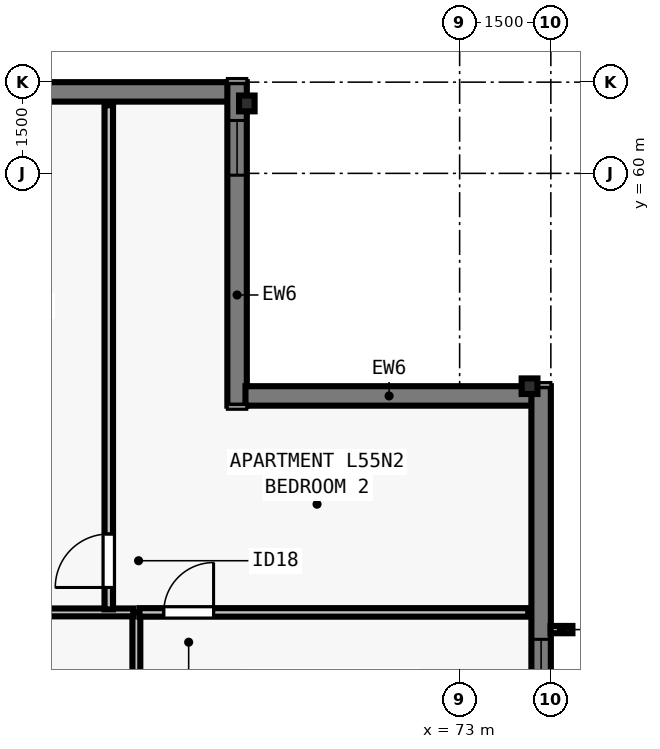
"""IFC4 building model, lengths in metres.
Left out: names, types, materials, properties, quantities, classifications, styles, units other than length and angle.
Written with IfcOpenShell. Run it as: python <this file> out.ifc"""

import sys

from ifc_helpers import new_model, si_unit, direction, frame, frame_2d, origin, origin_2d, place, context, subcontext, project, spatial, rectangle, i_section, extrude, element, fill, save


model = new_model("IFC4")
c1 = context("Model", 3, precision=1e-05, world=origin(), true_north=direction((0.0, 1.0)))
c2 = subcontext(c1, "Body", "Model", "MODEL_VIEW")
j1 = project(units=[si_unit("LENGTHUNIT", "METRE"), si_unit("PLANEANGLEUNIT", "RADIAN")], contexts=[c1])
p1 = place(None, origin())
s1 = spatial("IfcSite", under=j1, at=p1, CompositionType="ELEMENT")
p2 = place(p1, origin())
s2 = spatial("IfcBuilding", under=s1, at=p2, CompositionType="ELEMENT")
p3 = place(p2, frame((0.0, 0.0, 202.5)))
s3 = spatial("IfcBuildingStorey", under=s2, at=p3, CompositionType="ELEMENT", Elevation=202.5)
for number, where, z_axis, x_axis in (
    (1, (74.15, 56.5, 0.0), (0.0, 0.0, 1.0), (0.0, 1.0, 0.0)),
    (2, (69.5, 61.15, 0.0), (0.0, 0.0, 1.0), (1.0, 0.0, 0.0)),
):
    element("IfcColumn", number, at=place(p3, frame(where, z_axis=z_axis, x_axis=x_axis)), inside=s3, PredefinedType="COLUMN", context=c2, shape_type="SweptSolid", body=[
        extrude(i_section(OverallWidth=0.256, OverallDepth=0.26, WebThickness=0.01, FlangeThickness=0.017, FilletRadius=0.013, at=origin_2d()), origin(), (0.0, 0.0, 1.0), 3.5),
    ])
p4 = place(p3, frame((62.8, 61.34, 0.0), z_axis=(0.0, 0.0, 1.0), x_axis=(1.0, 0.0, 0.0)))
e3 = element("IfcWall", 3, at=p4, inside=s3, PredefinedType="SOLIDWALL", context=c2, shape_type="SweptSolid", body=[
    extrude(rectangle(XDim=6.402, YDim=0.32, at=frame_2d((3.201, 0.0))), origin(), (0.0, 0.0, 1.0), 3.29),
])
p5 = place(p3, frame((69.34, 61.5, 0.0), z_axis=(0.0, 0.0, 1.0), x_axis=(0.0, -1.0, 0.0)))
e4 = element("IfcWall", 4, at=p5, inside=s3, PredefinedType="SOLIDWALL", context=c2, shape_type="SweptSolid", body=[
    extrude(rectangle(XDim=5.32, YDim=0.32, at=frame_2d((2.66, 0.0))), origin(), (0.0, 0.0, 1.0), 3.29),
])
p6 = place(p5, frame((0.63, 0.0, 0.8)))
e5 = element("IfcOpeningElement", 5, at=p6, cuts=e4, PredefinedType="OPENING", context=c2, shape_type="SweptSolid", body=[
    extrude(rectangle(XDim=0.9, YDim=1.678, at=frame_2d((0.45, 0.839))), frame((0.0, 0.17, 0.0), z_axis=(0.0, -1.0, 0.0), x_axis=(1.0, 0.0, 0.0)), (0.0, 0.0, 1.0), 0.34),
])
p7 = place(p3, frame((69.478, 56.34, 0.0), z_axis=(0.0, 0.0, 1.0), x_axis=(1.0, 0.0, 0.0)))
e6 = element("IfcWall", 6, at=p7, inside=s3, PredefinedType="SOLIDWALL", context=c2, shape_type="SweptSolid", body=[
    extrude(rectangle(XDim=4.724, YDim=0.32, at=frame_2d((2.362, 0.0))), origin(), (0.0, 0.0, 1.0), 3.29),
])
p8 = place(p3, frame((74.34, 56.5, 0.0), z_axis=(0.0, 0.0, 1.0), x_axis=(0.0, -1.0, 0.0)))
e7 = element("IfcWall", 7, at=p8, inside=s3, PredefinedType="SOLIDWALL", context=c2, shape_type="SweptSolid", body=[
    extrude(rectangle(XDim=34.702, YDim=0.32, at=frame_2d((17.351, 0.0))), origin(), (0.0, 0.0, 1.0), 3.29),
])
p9 = place(p8, frame((4.163, 0.0, 0.8)))
e8 = element("IfcOpeningElement", 8, at=p9, cuts=e7, PredefinedType="OPENING", context=c2, shape_type="SweptSolid", body=[
    extrude(rectangle(XDim=1.85, YDim=1.678, at=frame_2d((0.925, 0.839))), frame((0.0, 0.17, 0.0), z_axis=(0.0, -1.0, 0.0), x_axis=(1.0, 0.0, 0.0)), (0.0, 0.0, 1.0), 0.34),
])
p10 = place(p8, frame((6.888, 0.0, 0.8)))
e9 = element("IfcOpeningElement", 9, at=p10, cuts=e7, PredefinedType="OPENING", context=c2, shape_type="SweptSolid", body=[
    extrude(rectangle(XDim=1.55, YDim=1.678, at=frame_2d((0.775, 0.839))), frame((0.0, 0.17, 0.0), z_axis=(0.0, -1.0, 0.0), x_axis=(1.0, 0.0, 0.0)), (0.0, 0.0, 1.0), 0.34),
])
p11 = place(p8, frame((10.113, 0.0, 0.8)))
e10 = element("IfcOpeningElement", 10, at=p11, cuts=e7, PredefinedType="OPENING", context=c2, shape_type="SweptSolid", body=[
    extrude(rectangle(XDim=1.85, YDim=1.678, at=frame_2d((0.925, 0.839))), frame((0.0, 0.17, 0.0), z_axis=(0.0, -1.0, 0.0), x_axis=(1.0, 0.0, 0.0)), (0.0, 0.0, 1.0), 0.34),
])
p12 = place(p8, frame((14.888, 0.0, 0.8)))
e11 = element("IfcOpeningElement", 11, at=p12, cuts=e7, PredefinedType="OPENING", context=c2, shape_type="SweptSolid", body=[
    extrude(rectangle(XDim=1.55, YDim=1.678, at=frame_2d((0.775, 0.839))), frame((0.0, 0.17, 0.0), z_axis=(0.0, -1.0, 0.0), x_axis=(1.0, 0.0, 0.0)), (0.0, 0.0, 1.0), 0.34),
])
p13 = place(p8, frame((18.114, 0.0, 0.8)))
e12 = element("IfcOpeningElement", 12, at=p13, cuts=e7, PredefinedType="OPENING", context=c2, shape_type="SweptSolid", body=[
    extrude(rectangle(XDim=1.85, YDim=1.678, at=frame_2d((0.925, 0.839))), frame((0.0, 0.17, 0.0), z_axis=(0.0, -1.0, 0.0), x_axis=(1.0, 0.0, 0.0)), (0.0, 0.0, 1.0), 0.34),
])
p14 = place(p8, frame((23.614, 0.0, 0.8)))
e13 = element("IfcOpeningElement", 13, at=p14, cuts=e7, PredefinedType="OPENING", context=c2, shape_type="SweptSolid", body=[
    extrude(rectangle(XDim=1.85, YDim=1.678, at=frame_2d((0.925, 0.839))), frame((0.0, 0.17, 0.0), z_axis=(0.0, -1.0, 0.0), x_axis=(1.0, 0.0, 0.0)), (0.0, 0.0, 1.0), 0.34),
])
p15 = place(p8, frame((28.839, 0.0, 0.8)))
e14 = element("IfcOpeningElement", 14, at=p15, cuts=e7, PredefinedType="OPENING", context=c2, shape_type="SweptSolid", body=[
    extrude(rectangle(XDim=1.55, YDim=1.678, at=frame_2d((0.775, 0.839))), frame((0.0, 0.17, 0.0), z_axis=(0.0, -1.0, 0.0), x_axis=(1.0, 0.0, 0.0)), (0.0, 0.0, 1.0), 0.34),
])
p16 = place(p3, frame((67.684, 50.03, 0.0), z_axis=(0.0, 0.0, 1.0), x_axis=(0.0, 1.0, 0.0)))
e15 = element("IfcWall", 15, at=p16, inside=s3, PredefinedType="PLUMBINGWALL", context=c2, shape_type="SweptSolid", body=[
    extrude(rectangle(XDim=2.75, YDim=0.13, at=frame_2d((1.375, 0.0))), origin(), (0.0, 0.0, 1.0), 3.29),
])
p17 = place(p3, frame((64.484, 52.78, 0.0), z_axis=(0.0, 0.0, 1.0), x_axis=(1.0, 0.0, 0.0)))
e16 = element("IfcWall", 16, at=p17, inside=s3, PredefinedType="PLUMBINGWALL", context=c2, shape_type="SweptSolid", body=[
    extrude(rectangle(XDim=3.15, YDim=0.13, at=frame_2d((1.575, 0.0))), origin(), (0.0, 0.0, 1.0), 3.29),
])
p18 = place(p3, frame((67.23, 52.83, 0.0), z_axis=(0.0, 0.0, 1.0), x_axis=(0.0, 1.0, 0.0)))
e17 = element("IfcWall", 17, at=p18, inside=s3, PredefinedType="PARTITIONING", context=c2, shape_type="SweptSolid", body=[
    extrude(rectangle(XDim=8.29, YDim=0.14, at=frame_2d((4.145, 0.0))), origin(), (0.0, 0.0, 1.0), 2.573),
])
p19 = place(p18, frame((0.36, 0.0, 0.0)))
e18 = element("IfcOpeningElement", 18, at=p19, cuts=e17, PredefinedType="OPENING", context=c2, shape_type="SweptSolid", body=[
    extrude(rectangle(XDim=0.88, YDim=2.1, at=frame_2d((0.44, 1.05))), frame((0.0, 0.08, 0.0), z_axis=(0.0, -1.0, 0.0), x_axis=(1.0, 0.0, 0.0)), (0.0, 0.0, 1.0), 0.16),
])
p20 = place(p3, frame((67.734, 52.78, 0.0), z_axis=(0.0, 0.0, 1.0), x_axis=(1.0, 0.0, 0.0)))
e19 = element("IfcWall", 19, at=p20, inside=s3, PredefinedType="PARTITIONING", context=c2, shape_type="SweptSolid", body=[
    extrude(rectangle(XDim=6.396, YDim=0.14, at=frame_2d((3.198, 0.0))), origin(), (0.0, 0.0, 1.0), 2.958),
])
p21 = place(p20, frame((0.4, 0.0, 0.0)))
e20 = element("IfcOpeningElement", 20, at=p21, cuts=e19, PredefinedType="OPENING", context=c2, shape_type="SweptSolid", body=[
    extrude(rectangle(XDim=0.82, YDim=2.1, at=frame_2d((0.41, 1.05))), frame((0.0, 0.08, 0.0), z_axis=(0.0, -1.0, 0.0), x_axis=(1.0, 0.0, 0.0)), (0.0, 0.0, 1.0), 0.16),
])
p22 = place(p9, origin())
e21 = element("IfcWindow", 21, at=p22, inside=s3, PartitioningType="SINGLE_PANEL", PredefinedType="WINDOW", context=c2, shape_type="SweptSolid", body=[
    extrude(rectangle(XDim=1.85, YDim=1.678, at=frame_2d((0.925, 0.839))), frame((0.0, -0.05, 0.0), z_axis=(0.0, -1.0, 0.0), x_axis=(1.0, 0.0, 0.0)), (0.0, 0.0, 1.0), 0.06),
])
fill(e8, e21)
p23 = place(p6, origin())
e22 = element("IfcWindow", 22, at=p23, inside=s3, PartitioningType="SINGLE_PANEL", PredefinedType="WINDOW", context=c2, shape_type="SweptSolid", body=[
    extrude(rectangle(XDim=0.9, YDim=1.678, at=frame_2d((0.45, 0.839))), frame((0.0, -0.04, 0.0), z_axis=(0.0, -1.0, 0.0), x_axis=(1.0, 0.0, 0.0)), (0.0, 0.0, 1.0), 0.06),
])
fill(e5, e22)
p24 = place(p21, origin())
e23 = element("IfcDoor", 23, at=p24, inside=s3, OperationType="SINGLE_SWING_RIGHT", PredefinedType="DOOR", context=c2, shape_type="SweptSolid", body=[
    extrude(rectangle(XDim=0.82, YDim=2.1, at=frame_2d((0.41, 1.05))), frame((0.0, 0.025, 0.0), z_axis=(0.0, -1.0, 0.0), x_axis=(1.0, 0.0, 0.0)), (0.0, 0.0, 1.0), 0.05),
])
fill(e20, e23)
p25 = place(p19, origin())
e24 = element("IfcDoor", 24, at=p25, inside=s3, OperationType="SINGLE_SWING_LEFT", PredefinedType="DOOR", context=c2, shape_type="SweptSolid", body=[
    extrude(rectangle(XDim=0.88, YDim=2.1, at=frame_2d((0.44, 1.05))), frame((0.0, 0.025, 0.0), z_axis=(0.0, -1.0, 0.0), x_axis=(1.0, 0.0, 0.0)), (0.0, 0.0, 1.0), 0.05),
])
fill(e18, e24)
save(model, sys.argv[1])
